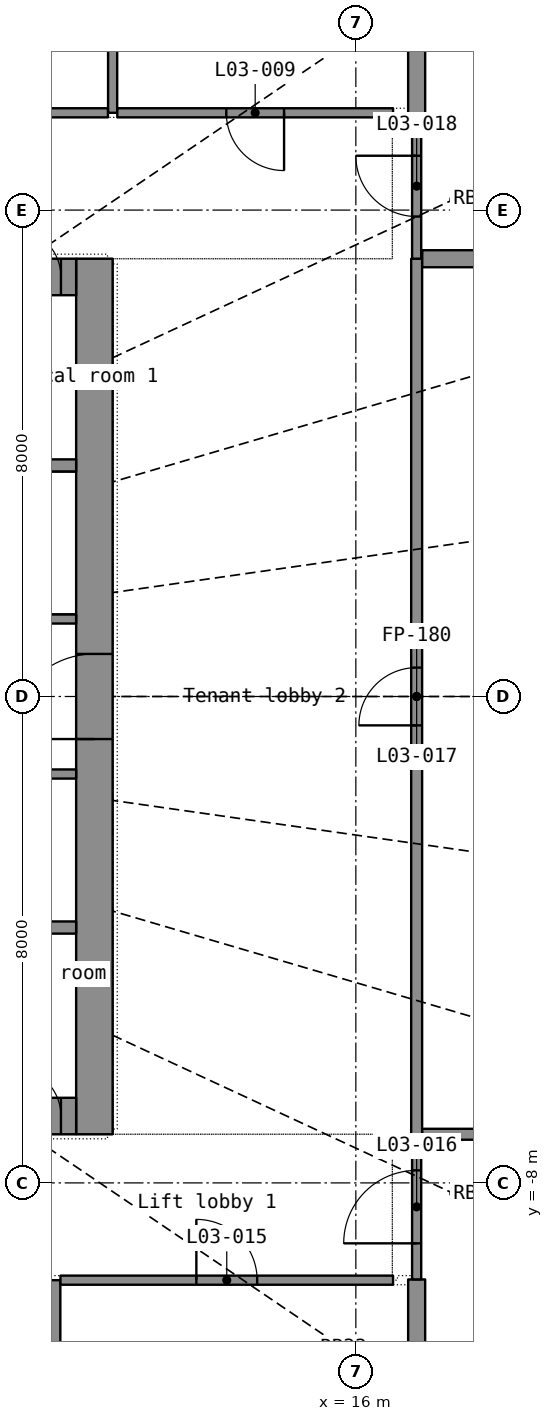
"""IFC4 building model, lengths in metres.
Left out: names, types, materials, properties, quantities, classifications, styles, units other than length and angle.
Written with IfcOpenShell. Run it as: python <this file> out.ifc"""

import sys

from ifc_helpers import new_model, si_unit, direction, frame, frame_2d, origin, place, context, subcontext, project, spatial, rectangle, extrude, element, fill, save


model = new_model("IFC4")
c1 = context("Model", 3, precision=1e-05, world=origin(), true_north=direction((0.0, 1.0)))
c2 = subcontext(c1, "Body", "Model", "MODEL_VIEW")
j1 = project(units=[si_unit("LENGTHUNIT", "METRE"), si_unit("PLANEANGLEUNIT", "RADIAN")], contexts=[c1])
p1 = place(None, origin())
s1 = spatial("IfcSite", under=j1, at=p1, CompositionType="ELEMENT")
p2 = place(p1, origin())
s2 = spatial("IfcBuilding", under=s1, at=p2, CompositionType="ELEMENT")
p3 = place(p2, frame((0.0, 0.0, 20.0)))
s3 = spatial("IfcBuildingStorey", under=s2, at=p3, CompositionType="ELEMENT", Elevation=20.0)
p4 = place(p3, frame((11.7, -7.2, 0.0), z_axis=(0.0, 0.0, 1.0), x_axis=(0.0, 1.0, 0.0)))
e1 = element("IfcWall", 1, at=p4, inside=s3, PredefinedType="SHEAR", context=c2, shape_type="SweptSolid", body=[
    extrude(rectangle(XDim=14.4, YDim=0.6, at=frame_2d((7.2, 0.0))), origin(), (0.0, 0.0, 1.0), 4.1),
])
p5 = place(p4, frame((6.5, 0.0, 0.0)))
e2 = element("IfcOpeningElement", 2, at=p5, cuts=e1, PredefinedType="OPENING", context=c2, shape_type="SweptSolid", body=[
    extrude(rectangle(XDim=1.4, YDim=2.2, at=frame_2d((0.7, 1.1))), frame((0.0, 0.31, 0.0), z_axis=(0.0, -1.0, 0.0), x_axis=(1.0, 0.0, 0.0)), (0.0, 0.0, 1.0), 0.62),
])
p6 = place(p3, frame((-11.4, -6.9, 0.0), z_axis=(0.0, 0.0, 1.0), x_axis=(1.0, 0.0, 0.0)))
e3 = element("IfcWall", 3, at=p6, inside=s3, PredefinedType="SHEAR", context=c2, shape_type="SweptSolid", body=[
    extrude(rectangle(XDim=22.8, YDim=0.6, at=frame_2d((11.4, 0.0))), origin(), (0.0, 0.0, 1.0), 4.1),
])
p7 = place(p6, frame((1.85, 0.0, 0.0)))
e4 = element("IfcOpeningElement", 4, at=p7, cuts=e3, PredefinedType="OPENING", context=c2, shape_type="SweptSolid", body=[
    extrude(rectangle(XDim=1.1, YDim=2.2, at=frame_2d((0.55, 1.1))), frame((0.0, 0.31, 0.0), z_axis=(0.0, -1.0, 0.0), x_axis=(1.0, 0.0, 0.0)), (0.0, 0.0, 1.0), 0.62),
])
p8 = place(p6, frame((3.85, 0.0, 0.0)))
e5 = element("IfcOpeningElement", 5, at=p8, cuts=e3, PredefinedType="OPENING", context=c2, shape_type="SweptSolid", body=[
    extrude(rectangle(XDim=1.1, YDim=2.2, at=frame_2d((0.55, 1.1))), frame((0.0, 0.31, 0.0), z_axis=(0.0, -1.0, 0.0), x_axis=(1.0, 0.0, 0.0)), (0.0, 0.0, 1.0), 0.62),
])
p9 = place(p6, frame((5.85, 0.0, 0.0)))
e6 = element("IfcOpeningElement", 6, at=p9, cuts=e3, PredefinedType="OPENING", context=c2, shape_type="SweptSolid", body=[
    extrude(rectangle(XDim=1.1, YDim=2.2, at=frame_2d((0.55, 1.1))), frame((0.0, 0.31, 0.0), z_axis=(0.0, -1.0, 0.0), x_axis=(1.0, 0.0, 0.0)), (0.0, 0.0, 1.0), 0.62),
])
p10 = place(p6, frame((7.85, 0.0, 0.0)))
e7 = element("IfcOpeningElement", 7, at=p10, cuts=e3, PredefinedType="OPENING", context=c2, shape_type="SweptSolid", body=[
    extrude(rectangle(XDim=1.1, YDim=2.2, at=frame_2d((0.55, 1.1))), frame((0.0, 0.31, 0.0), z_axis=(0.0, -1.0, 0.0), x_axis=(1.0, 0.0, 0.0)), (0.0, 0.0, 1.0), 0.62),
])
p11 = place(p6, frame((9.85, 0.0, 0.0)))
e8 = element("IfcOpeningElement", 8, at=p11, cuts=e3, PredefinedType="OPENING", context=c2, shape_type="SweptSolid", body=[
    extrude(rectangle(XDim=1.1, YDim=2.2, at=frame_2d((0.55, 1.1))), frame((0.0, 0.31, 0.0), z_axis=(0.0, -1.0, 0.0), x_axis=(1.0, 0.0, 0.0)), (0.0, 0.0, 1.0), 0.62),
])
p12 = place(p6, frame((11.85, 0.0, 0.0)))
e9 = element("IfcOpeningElement", 9, at=p12, cuts=e3, PredefinedType="OPENING", context=c2, shape_type="SweptSolid", body=[
    extrude(rectangle(XDim=1.1, YDim=2.2, at=frame_2d((0.55, 1.1))), frame((0.0, 0.31, 0.0), z_axis=(0.0, -1.0, 0.0), x_axis=(1.0, 0.0, 0.0)), (0.0, 0.0, 1.0), 0.62),
])
p13 = place(p6, frame((13.85, 0.0, 0.0)))
e10 = element("IfcOpeningElement", 10, at=p13, cuts=e3, PredefinedType="OPENING", context=c2, shape_type="SweptSolid", body=[
    extrude(rectangle(XDim=1.1, YDim=2.2, at=frame_2d((0.55, 1.1))), frame((0.0, 0.31, 0.0), z_axis=(0.0, -1.0, 0.0), x_axis=(1.0, 0.0, 0.0)), (0.0, 0.0, 1.0), 0.62),
])
p14 = place(p6, frame((15.85, 0.0, 0.0)))
e11 = element("IfcOpeningElement", 11, at=p14, cuts=e3, PredefinedType="OPENING", context=c2, shape_type="SweptSolid", body=[
    extrude(rectangle(XDim=1.1, YDim=2.2, at=frame_2d((0.55, 1.1))), frame((0.0, 0.31, 0.0), z_axis=(0.0, -1.0, 0.0), x_axis=(1.0, 0.0, 0.0)), (0.0, 0.0, 1.0), 0.62),
])
p15 = place(p6, frame((19.85, 0.0, 0.0)))
e12 = element("IfcOpeningElement", 12, at=p15, cuts=e3, PredefinedType="OPENING", context=c2, shape_type="SweptSolid", body=[
    extrude(rectangle(XDim=1.1, YDim=2.2, at=frame_2d((0.55, 1.1))), frame((0.0, 0.31, 0.0), z_axis=(0.0, -1.0, 0.0), x_axis=(1.0, 0.0, 0.0)), (0.0, 0.0, 1.0), 0.62),
])
p16 = place(p6, frame((0.25, 0.0, 0.0)))
e13 = element("IfcOpeningElement", 13, at=p16, cuts=e3, PredefinedType="OPENING", context=c2, shape_type="SweptSolid", body=[
    extrude(rectangle(XDim=0.8, YDim=2.05, at=frame_2d((0.4, 1.025))), frame((0.0, 0.31, 0.0), z_axis=(0.0, -1.0, 0.0), x_axis=(1.0, 0.0, 0.0)), (0.0, 0.0, 1.0), 0.62),
])
p17 = place(p6, frame((21.75, 0.0, 0.0)))
e14 = element("IfcOpeningElement", 14, at=p17, cuts=e3, PredefinedType="OPENING", context=c2, shape_type="SweptSolid", body=[
    extrude(rectangle(XDim=0.8, YDim=2.05, at=frame_2d((0.4, 1.025))), frame((0.0, 0.31, 0.0), z_axis=(0.0, -1.0, 0.0), x_axis=(1.0, 0.0, 0.0)), (0.0, 0.0, 1.0), 0.62),
])
p18 = place(p3, frame((-11.4, 6.9, 0.0), z_axis=(0.0, 0.0, 1.0), x_axis=(1.0, 0.0, 0.0)))
e15 = element("IfcWall", 15, at=p18, inside=s3, PredefinedType="SHEAR", context=c2, shape_type="SweptSolid", body=[
    extrude(rectangle(XDim=22.8, YDim=0.6, at=frame_2d((11.4, 0.0))), origin(), (0.0, 0.0, 1.0), 4.1),
])
p19 = place(p18, frame((1.85, 0.0, 0.0)))
e16 = element("IfcOpeningElement", 16, at=p19, cuts=e15, PredefinedType="OPENING", context=c2, shape_type="SweptSolid", body=[
    extrude(rectangle(XDim=1.1, YDim=2.2, at=frame_2d((0.55, 1.1))), frame((0.0, 0.31, 0.0), z_axis=(0.0, -1.0, 0.0), x_axis=(1.0, 0.0, 0.0)), (0.0, 0.0, 1.0), 0.62),
])
p20 = place(p18, frame((9.95, 0.0, 0.0)))
e17 = element("IfcOpeningElement", 17, at=p20, cuts=e15, PredefinedType="OPENING", context=c2, shape_type="SweptSolid", body=[
    extrude(rectangle(XDim=0.9, YDim=2.1, at=frame_2d((0.45, 1.05))), frame((0.0, 0.31, 0.0), z_axis=(0.0, -1.0, 0.0), x_axis=(1.0, 0.0, 0.0)), (0.0, 0.0, 1.0), 0.62),
])
p21 = place(p18, frame((17.95, 0.0, 0.0)))
e18 = element("IfcOpeningElement", 18, at=p21, cuts=e15, PredefinedType="OPENING", context=c2, shape_type="SweptSolid", body=[
    extrude(rectangle(XDim=0.9, YDim=2.1, at=frame_2d((0.45, 1.05))), frame((0.0, 0.31, 0.0), z_axis=(0.0, -1.0, 0.0), x_axis=(1.0, 0.0, 0.0)), (0.0, 0.0, 1.0), 0.62),
])
p22 = place(p18, frame((0.25, 0.0, 0.0)))
e19 = element("IfcOpeningElement", 19, at=p22, cuts=e15, PredefinedType="OPENING", context=c2, shape_type="SweptSolid", body=[
    extrude(rectangle(XDim=0.8, YDim=2.05, at=frame_2d((0.4, 1.025))), frame((0.0, 0.31, 0.0), z_axis=(0.0, -1.0, 0.0), x_axis=(1.0, 0.0, 0.0)), (0.0, 0.0, 1.0), 0.62),
])
p23 = place(p18, frame((21.75, 0.0, 0.0)))
e20 = element("IfcOpeningElement", 20, at=p23, cuts=e15, PredefinedType="OPENING", context=c2, shape_type="SweptSolid", body=[
    extrude(rectangle(XDim=0.8, YDim=2.05, at=frame_2d((0.4, 1.025))), frame((0.0, 0.31, 0.0), z_axis=(0.0, -1.0, 0.0), x_axis=(1.0, 0.0, 0.0)), (0.0, 0.0, 1.0), 0.62),
])
for number, where, z_axis, x_axis in (
    (21, (-11.4, -3.8, 0.0), (0.0, 0.0, 1.0), (1.0, 0.0, 0.0)),
    (22, (-11.4, 3.8, 0.0), (0.0, 0.0, 1.0), (1.0, 0.0, 0.0)),
):
    element("IfcWall", number, at=place(p3, frame(where, z_axis=z_axis, x_axis=x_axis)), inside=s3, PredefinedType="SHEAR", context=c2, shape_type="SweptSolid", body=[
        extrude(rectangle(XDim=22.8, YDim=0.2, at=frame_2d((11.4, 0.0))), origin(), (0.0, 0.0, 1.0), 4.1),
    ])
p24 = place(p3, frame((3.0, -1.275, 0.0), z_axis=(0.0, 0.0, 1.0), x_axis=(1.0, 0.0, 0.0)))
e23 = element("IfcWall", 23, at=p24, inside=s3, PredefinedType="PARTITIONING", context=c2, shape_type="SweptSolid", body=[
    extrude(rectangle(XDim=8.4, YDim=0.15, at=frame_2d((4.2, 0.0))), origin(), (0.0, 0.0, 1.0), 4.1),
])
p25 = place(p24, frame((0.36, 0.0, 0.0)))
e24 = element("IfcOpeningElement", 24, at=p25, cuts=e23, PredefinedType="OPENING", context=c2, shape_type="SweptSolid", body=[
    extrude(rectangle(XDim=0.9, YDim=2.1, at=frame_2d((0.45, 1.05))), frame((0.0, 0.085, 0.0), z_axis=(0.0, -1.0, 0.0), x_axis=(1.0, 0.0, 0.0)), (0.0, 0.0, 1.0), 0.17),
])
p26 = place(p24, frame((2.56, 0.0, 0.0)))
e25 = element("IfcOpeningElement", 25, at=p26, cuts=e23, PredefinedType="OPENING", context=c2, shape_type="SweptSolid", body=[
    extrude(rectangle(XDim=0.85, YDim=2.1, at=frame_2d((0.425, 1.05))), frame((0.0, 0.085, 0.0), z_axis=(0.0, -1.0, 0.0), x_axis=(1.0, 0.0, 0.0)), (0.0, 0.0, 1.0), 0.17),
])
p27 = place(p24, frame((5.95, 0.0, 0.0)))
e26 = element("IfcOpeningElement", 26, at=p27, cuts=e23, PredefinedType="OPENING", context=c2, shape_type="SweptSolid", body=[
    extrude(rectangle(XDim=0.85, YDim=2.1, at=frame_2d((0.425, 1.05))), frame((0.0, 0.085, 0.0), z_axis=(0.0, -1.0, 0.0), x_axis=(1.0, 0.0, 0.0)), (0.0, 0.0, 1.0), 0.17),
])
p28 = place(p3, frame((3.0, 1.275, 0.0), z_axis=(0.0, 0.0, 1.0), x_axis=(1.0, 0.0, 0.0)))
e27 = element("IfcWall", 27, at=p28, inside=s3, PredefinedType="SHEAR", context=c2, shape_type="SweptSolid", body=[
    extrude(rectangle(XDim=8.4, YDim=0.15, at=frame_2d((4.2, 0.0))), origin(), (0.0, 0.0, 1.0), 4.1),
])
p29 = place(p28, frame((2.05, 0.0, 0.0)))
e28 = element("IfcOpeningElement", 28, at=p29, cuts=e27, PredefinedType="OPENING", context=c2, shape_type="SweptSolid", body=[
    extrude(rectangle(XDim=1.1, YDim=2.15, at=frame_2d((0.55, 1.075))), frame((0.0, 0.085, 0.0), z_axis=(0.0, -1.0, 0.0), x_axis=(1.0, 0.0, 0.0)), (0.0, 0.0, 1.0), 0.17),
])
p30 = place(p28, frame((0.45, 0.0, 0.0)))
e29 = element("IfcOpeningElement", 29, at=p30, cuts=e27, PredefinedType="OPENING", context=c2, shape_type="SweptSolid", body=[
    extrude(rectangle(XDim=0.9, YDim=2.1, at=frame_2d((0.45, 1.05))), frame((0.0, 0.085, 0.0), z_axis=(0.0, -1.0, 0.0), x_axis=(1.0, 0.0, 0.0)), (0.0, 0.0, 1.0), 0.17),
])
p31 = place(p3, frame((17.0, -7.2, 0.0), z_axis=(0.0, 0.0, 1.0), x_axis=(0.0, 1.0, 0.0)))
e30 = element("IfcWall", 30, at=p31, inside=s3, PredefinedType="PARTITIONING", context=c2, shape_type="SweptSolid", body=[
    extrude(rectangle(XDim=14.4, YDim=0.18, at=frame_2d((7.2, 0.0))), origin(), (0.0, 0.0, 1.0), 3.3),
])
p32 = place(p31, frame((6.725, 0.0, 0.0)))
e31 = element("IfcOpeningElement", 31, at=p32, cuts=e30, PredefinedType="OPENING", context=c2, shape_type="SweptSolid", body=[
    extrude(rectangle(XDim=0.95, YDim=2.15, at=frame_2d((0.475, 1.075))), frame((0.0, 0.1, 0.0), z_axis=(0.0, -1.0, 0.0), x_axis=(1.0, 0.0, 0.0)), (0.0, 0.0, 1.0), 0.2),
])
p33 = place(p3, frame((11.0, -21.562, 0.0), z_axis=(0.0, 0.0, 1.0), x_axis=(0.0, 1.0, 0.0)))
e32 = element("IfcWall", 32, at=p33, inside=s3, PredefinedType="PARTITIONING", context=c2, shape_type="SweptSolid", body=[
    extrude(rectangle(XDim=11.962, YDim=0.28, at=frame_2d((5.981, 0.0))), origin(), (0.0, 0.0, 1.0), 3.3),
])
p34 = place(p3, frame((12.0, 9.6, 0.0), z_axis=(0.0, 0.0, 1.0), x_axis=(0.0, 1.0, 0.0)))
e33 = element("IfcWall", 33, at=p34, inside=s3, PredefinedType="PARTITIONING", context=c2, shape_type="SweptSolid", body=[
    extrude(rectangle(XDim=11.623, YDim=0.15, at=frame_2d((5.811, 0.0))), origin(), (0.0, 0.0, 1.0), 3.3),
])
p35 = place(p3, frame((27.163, -7.2, 0.0), z_axis=(0.0, 0.0, 1.0), x_axis=(-1.0, 0.0, 0.0)))
e34 = element("IfcWall", 34, at=p35, inside=s3, PredefinedType="PARTITIONING", context=c2, shape_type="SweptSolid", body=[
    extrude(rectangle(XDim=10.071, YDim=0.18, at=frame_2d((5.035, 0.0))), origin(), (0.0, 0.0, 1.0), 3.3),
])
p36 = place(p3, frame((27.163, 7.2, 0.0), z_axis=(0.0, 0.0, 1.0), x_axis=(-1.0, 0.0, 0.0)))
e35 = element("IfcWall", 35, at=p36, inside=s3, PredefinedType="PARTITIONING", context=c2, shape_type="SweptSolid", body=[
    extrude(rectangle(XDim=10.071, YDim=0.28, at=frame_2d((5.035, 0.0))), origin(), (0.0, 0.0, 1.0), 3.3),
])
p37 = place(p36, frame((3.835, 0.0, 1.0)))
e36 = element("IfcOpeningElement", 36, at=p37, cuts=e35, PredefinedType="OPENING", context=c2, shape_type="SweptSolid", body=[
    extrude(rectangle(XDim=2.4, YDim=1.2, at=frame_2d((1.2, 0.6))), frame((0.0, 0.15, 0.0), z_axis=(0.0, -1.0, 0.0), x_axis=(1.0, 0.0, 0.0)), (0.0, 0.0, 1.0), 0.3),
])
p38 = place(p3, frame((17.0, -18.777, 0.0), z_axis=(0.0, 0.0, 1.0), x_axis=(0.0, 1.0, 0.0)))
e37 = element("IfcWall", 37, at=p38, inside=s3, PredefinedType="PARTITIONING", context=c2, shape_type="SweptSolid", body=[
    extrude(rectangle(XDim=9.189, YDim=0.28, at=frame_2d((4.594, 0.0))), origin(), (0.0, 0.0, 1.0), 3.3),
])
p39 = place(p3, frame((17.0, 9.588, 0.0), z_axis=(0.0, 0.0, 1.0), x_axis=(0.0, 1.0, 0.0)))
e38 = element("IfcWall", 38, at=p39, inside=s3, PredefinedType="PARTITIONING", context=c2, shape_type="SweptSolid", body=[
    extrude(rectangle(XDim=9.189, YDim=0.28, at=frame_2d((4.594, 0.0))), origin(), (0.0, 0.0, 1.0), 3.3),
])
p40 = place(p39, frame((3.394, 0.0, 1.0)))
e39 = element("IfcOpeningElement", 39, at=p40, cuts=e38, PredefinedType="OPENING", context=c2, shape_type="SweptSolid", body=[
    extrude(rectangle(XDim=2.4, YDim=1.2, at=frame_2d((1.2, 0.6))), frame((0.0, 0.15, 0.0), z_axis=(0.0, -1.0, 0.0), x_axis=(1.0, 0.0, 0.0)), (0.0, 0.0, 1.0), 0.3),
])
p41 = place(p3, frame((11.142, -9.6, 0.0), z_axis=(0.0, 0.0, 1.0), x_axis=(1.0, 0.0, 0.0)))
e40 = element("IfcWall", 40, at=p41, inside=s3, PredefinedType="PARTITIONING", context=c2, shape_type="SweptSolid", body=[
    extrude(rectangle(XDim=5.47, YDim=0.15, at=frame_2d((2.735, 0.0))), origin(), (0.0, 0.0, 1.0), 3.3),
])
p42 = place(p41, frame((2.235, 0.0, 0.0)))
e41 = element("IfcOpeningElement", 41, at=p42, cuts=e40, PredefinedType="OPENING", context=c2, shape_type="SweptSolid", body=[
    extrude(rectangle(XDim=1.0, YDim=2.2, at=frame_2d((0.5, 1.1))), frame((0.0, 0.085, 0.0), z_axis=(0.0, -1.0, 0.0), x_axis=(1.0, 0.0, 0.0)), (0.0, 0.0, 1.0), 0.17),
])
p43 = place(p3, frame((11.923, 9.6, 0.0), z_axis=(0.0, 0.0, 1.0), x_axis=(-1.0, 0.0, 0.0)))
e42 = element("IfcWall", 42, at=p43, inside=s3, PredefinedType="PARTITIONING", context=c2, shape_type="SweptSolid", body=[
    extrude(rectangle(XDim=5.246, YDim=0.15, at=frame_2d((2.623, 0.0))), origin(), (0.0, 0.0, 1.0), 3.3),
])
p44 = place(p43, frame((2.148, 0.0, 0.0)))
e43 = element("IfcOpeningElement", 43, at=p44, cuts=e42, PredefinedType="OPENING", context=c2, shape_type="SweptSolid", body=[
    extrude(rectangle(XDim=0.95, YDim=2.15, at=frame_2d((0.475, 1.075))), frame((0.0, 0.085, 0.0), z_axis=(0.0, -1.0, 0.0), x_axis=(1.0, 0.0, 0.0)), (0.0, 0.0, 1.0), 0.17),
])
p45 = place(p3, frame((16.612, 9.6, 0.0), z_axis=(0.0, 0.0, 1.0), x_axis=(-1.0, 0.0, 0.0)))
e44 = element("IfcWall", 44, at=p45, inside=s3, PredefinedType="PARTITIONING", context=c2, shape_type="SweptSolid", body=[
    extrude(rectangle(XDim=4.535, YDim=0.15, at=frame_2d((2.268, 0.0))), origin(), (0.0, 0.0, 1.0), 3.3),
])
p46 = place(p45, frame((1.792, 0.0, 0.0)))
e45 = element("IfcOpeningElement", 45, at=p46, cuts=e44, PredefinedType="OPENING", context=c2, shape_type="SweptSolid", body=[
    extrude(rectangle(XDim=0.95, YDim=2.15, at=frame_2d((0.475, 1.075))), frame((0.0, 0.085, 0.0), z_axis=(0.0, -1.0, 0.0), x_axis=(1.0, 0.0, 0.0)), (0.0, 0.0, 1.0), 0.17),
])
p47 = place(p3, frame((17.0, -9.587, 0.0), z_axis=(0.0, 0.0, 1.0), x_axis=(0.0, 1.0, 0.0)))
e46 = element("IfcWall", 46, at=p47, inside=s3, PredefinedType="PARTITIONING", context=c2, shape_type="SweptSolid", body=[
    extrude(rectangle(XDim=2.386, YDim=0.15, at=frame_2d((1.193, 0.0))), origin(), (0.0, 0.0, 1.0), 3.3),
])
p48 = place(p47, frame((0.593, 0.0, 0.0)))
e47 = element("IfcOpeningElement", 47, at=p48, cuts=e46, PredefinedType="OPENING", context=c2, shape_type="SweptSolid", body=[
    extrude(rectangle(XDim=1.2, YDim=2.2, at=frame_2d((0.6, 1.1))), frame((0.0, 0.085, 0.0), z_axis=(0.0, -1.0, 0.0), x_axis=(1.0, 0.0, 0.0)), (0.0, 0.0, 1.0), 0.17),
])
p49 = place(p3, frame((17.0, 7.201, 0.0), z_axis=(0.0, 0.0, 1.0), x_axis=(0.0, 1.0, 0.0)))
e48 = element("IfcWall", 48, at=p49, inside=s3, PredefinedType="PARTITIONING", context=c2, shape_type="SweptSolid", body=[
    extrude(rectangle(XDim=2.386, YDim=0.15, at=frame_2d((1.193, 0.0))), origin(), (0.0, 0.0, 1.0), 3.3),
])
p50 = place(p49, frame((0.693, 0.0, 0.0)))
e49 = element("IfcOpeningElement", 49, at=p50, cuts=e48, PredefinedType="OPENING", context=c2, shape_type="SweptSolid", body=[
    extrude(rectangle(XDim=1.0, YDim=2.2, at=frame_2d((0.5, 1.1))), frame((0.0, 0.085, 0.0), z_axis=(0.0, -1.0, 0.0), x_axis=(1.0, 0.0, 0.0)), (0.0, 0.0, 1.0), 0.17),
])
p51 = place(p17, origin())
e50 = element("IfcDoor", 50, at=p51, inside=s3, OperationType="SINGLE_SWING_LEFT", PredefinedType="DOOR", context=c2, shape_type="SweptSolid", body=[
    extrude(rectangle(XDim=0.8, YDim=2.05, at=frame_2d((0.4, 1.025))), frame((0.0, 0.025, 0.0), z_axis=(0.0, -1.0, 0.0), x_axis=(1.0, 0.0, 0.0)), (0.0, 0.0, 1.0), 0.05),
])
fill(e14, e50)
p52 = place(p23, origin())
e51 = element("IfcDoor", 51, at=p52, inside=s3, OperationType="SINGLE_SWING_LEFT", PredefinedType="DOOR", context=c2, shape_type="SweptSolid", body=[
    extrude(rectangle(XDim=0.8, YDim=2.05, at=frame_2d((0.4, 1.025))), frame((0.0, 0.025, 0.0), z_axis=(0.0, -1.0, 0.0), x_axis=(1.0, 0.0, 0.0)), (0.0, 0.0, 1.0), 0.05),
])
fill(e20, e51)
p53 = place(p5, origin())
e52 = element("IfcDoor", 52, at=p53, inside=s3, OperationType="DOUBLE_DOOR_SINGLE_SWING", PredefinedType="DOOR", context=c2, shape_type="SweptSolid", body=[
    extrude(rectangle(XDim=1.4, YDim=2.2, at=frame_2d((0.7, 1.1))), frame((0.0, 0.025, 0.0), z_axis=(0.0, -1.0, 0.0), x_axis=(1.0, 0.0, 0.0)), (0.0, 0.0, 1.0), 0.05),
])
fill(e2, e52)
p54 = place(p46, origin())
e53 = element("IfcDoor", 53, at=p54, inside=s3, OperationType="SINGLE_SWING_LEFT", PredefinedType="DOOR", context=c2, shape_type="SweptSolid", body=[
    extrude(rectangle(XDim=0.95, YDim=2.15, at=frame_2d((0.475, 1.075))), frame((0.0, 0.025, 0.0), z_axis=(0.0, -1.0, 0.0), x_axis=(1.0, 0.0, 0.0)), (0.0, 0.0, 1.0), 0.05),
])
fill(e45, e53)
p55 = place(p42, origin())
e54 = element("IfcDoor", 54, at=p55, inside=s3, OperationType="SINGLE_SWING_LEFT", PredefinedType="DOOR", context=c2, shape_type="SweptSolid", body=[
    extrude(rectangle(XDim=1.0, YDim=2.2, at=frame_2d((0.5, 1.1))), frame((0.0, 0.025, 0.0), z_axis=(0.0, -1.0, 0.0), x_axis=(1.0, 0.0, 0.0)), (0.0, 0.0, 1.0), 0.05),
])
fill(e41, e54)
p56 = place(p48, origin())
e55 = element("IfcDoor", 55, at=p56, inside=s3, OperationType="DOUBLE_DOOR_SINGLE_SWING", PredefinedType="DOOR", context=c2, shape_type="SweptSolid", body=[
    extrude(rectangle(XDim=1.2, YDim=2.2, at=frame_2d((0.6, 1.1))), frame((0.0, 0.025, 0.0), z_axis=(0.0, -1.0, 0.0), x_axis=(1.0, 0.0, 0.0)), (0.0, 0.0, 1.0), 0.05),
])
fill(e47, e55)
p57 = place(p32, origin())
e56 = element("IfcDoor", 56, at=p57, inside=s3, OperationType="SINGLE_SWING_LEFT", PredefinedType="DOOR", context=c2, shape_type="SweptSolid", body=[
    extrude(rectangle(XDim=0.95, YDim=2.15, at=frame_2d((0.475, 1.075))), frame((0.0, 0.025, 0.0), z_axis=(0.0, -1.0, 0.0), x_axis=(1.0, 0.0, 0.0)), (0.0, 0.0, 1.0), 0.05),
])
fill(e31, e56)
p58 = place(p50, origin())
e57 = element("IfcDoor", 57, at=p58, inside=s3, OperationType="SINGLE_SWING_RIGHT", PredefinedType="DOOR", context=c2, shape_type="SweptSolid", body=[
    extrude(rectangle(XDim=1.0, YDim=2.2, at=frame_2d((0.5, 1.1))), frame((0.0, 0.025, 0.0), z_axis=(0.0, -1.0, 0.0), x_axis=(1.0, 0.0, 0.0)), (0.0, 0.0, 1.0), 0.05),
])
fill(e49, e57)
save(model, sys.argv[1])
